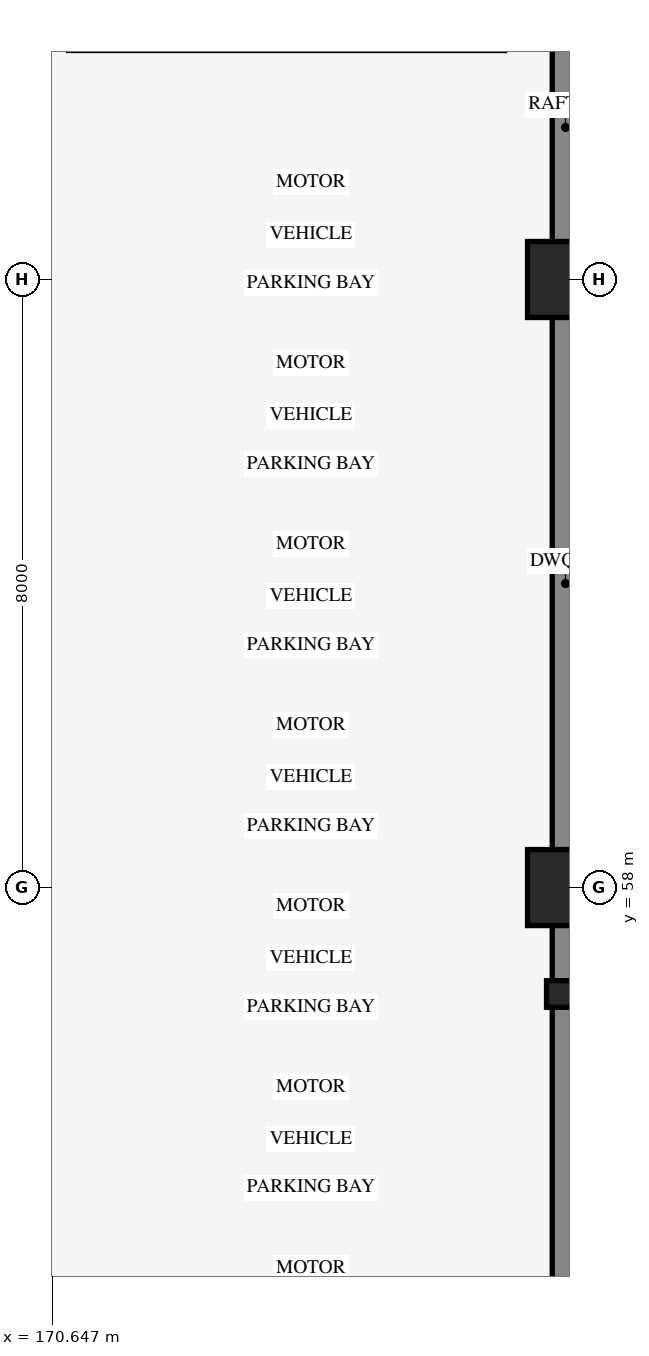
"""IFC4 building model, lengths in metres.
Left out: names, types, materials, properties, quantities, classifications, styles, units other than length and angle.
Written with IfcOpenShell. Run it as: python <this file> out.ifc"""

import sys

from ifc_helpers import new_model, si_unit, direction, frame, frame_2d, origin, origin_2d, place, context, subcontext, project, spatial, rectangle, extrude, element, save


model = new_model("IFC4")
c1 = context("Model", 3, precision=1e-05, world=origin(), true_north=direction((0.0, 1.0)))
c2 = subcontext(c1, "Body", "Model", "MODEL_VIEW")
j1 = project(units=[si_unit("LENGTHUNIT", "METRE"), si_unit("PLANEANGLEUNIT", "RADIAN")], contexts=[c1])
p1 = place(None, origin())
s1 = spatial("IfcSite", under=j1, at=p1, CompositionType="ELEMENT")
p2 = place(p1, origin())
s2 = spatial("IfcBuilding", under=s1, at=p2, CompositionType="ELEMENT")
p3 = place(p2, frame((0.0, 0.0, -9.0)))
s3 = spatial("IfcBuildingStorey", under=s2, at=p3, CompositionType="ELEMENT", Elevation=-9.0)
p4 = place(p3, frame((177.4, 26.0, 0.0), z_axis=(0.0, 0.0, 1.0), x_axis=(0.0, 1.0, 0.0)))
e1 = element("IfcWall", 1, at=p4, inside=s3, PredefinedType="SOLIDWALL", context=c2, shape_type="SweptSolid", body=[
    extrude(rectangle(XDim=80.0, YDim=0.35, at=frame_2d((40.0, 0.0))), origin(), (0.0, 0.0, 1.0), 4.22),
])
for number, where, z_axis, x_axis in (
    (2, (177.4, 58.0, 0.0), (0.0, 0.0, 1.0), (1.0, 0.0, 0.0)),
    (3, (177.4, 66.0, 0.0), (0.0, 0.0, 1.0), (1.0, 0.0, 0.0)),
):
    element("IfcColumn", number, at=place(p3, frame(where, z_axis=z_axis, x_axis=x_axis)), inside=s3, PredefinedType="COLUMN", context=c2, shape_type="SweptSolid", body=[
        extrude(rectangle(XDim=1.0, YDim=1.0, at=origin_2d()), origin(), (0.0, 0.0, 1.0), 4.5),
    ])
p5 = place(p3, frame((177.4, 56.6, 0.0), z_axis=(0.0, 0.0, 1.0), x_axis=(0.0, 1.0, 0.0)))
e4 = element("IfcColumn", 4, at=p5, inside=s3, PredefinedType="PILASTER", context=c2, shape_type="SweptSolid", body=[
    extrude(rectangle(XDim=0.35, YDim=0.5, at=origin_2d()), origin(), (0.0, 0.0, 1.0), 4.5),
])
save(model, sys.argv[1])
